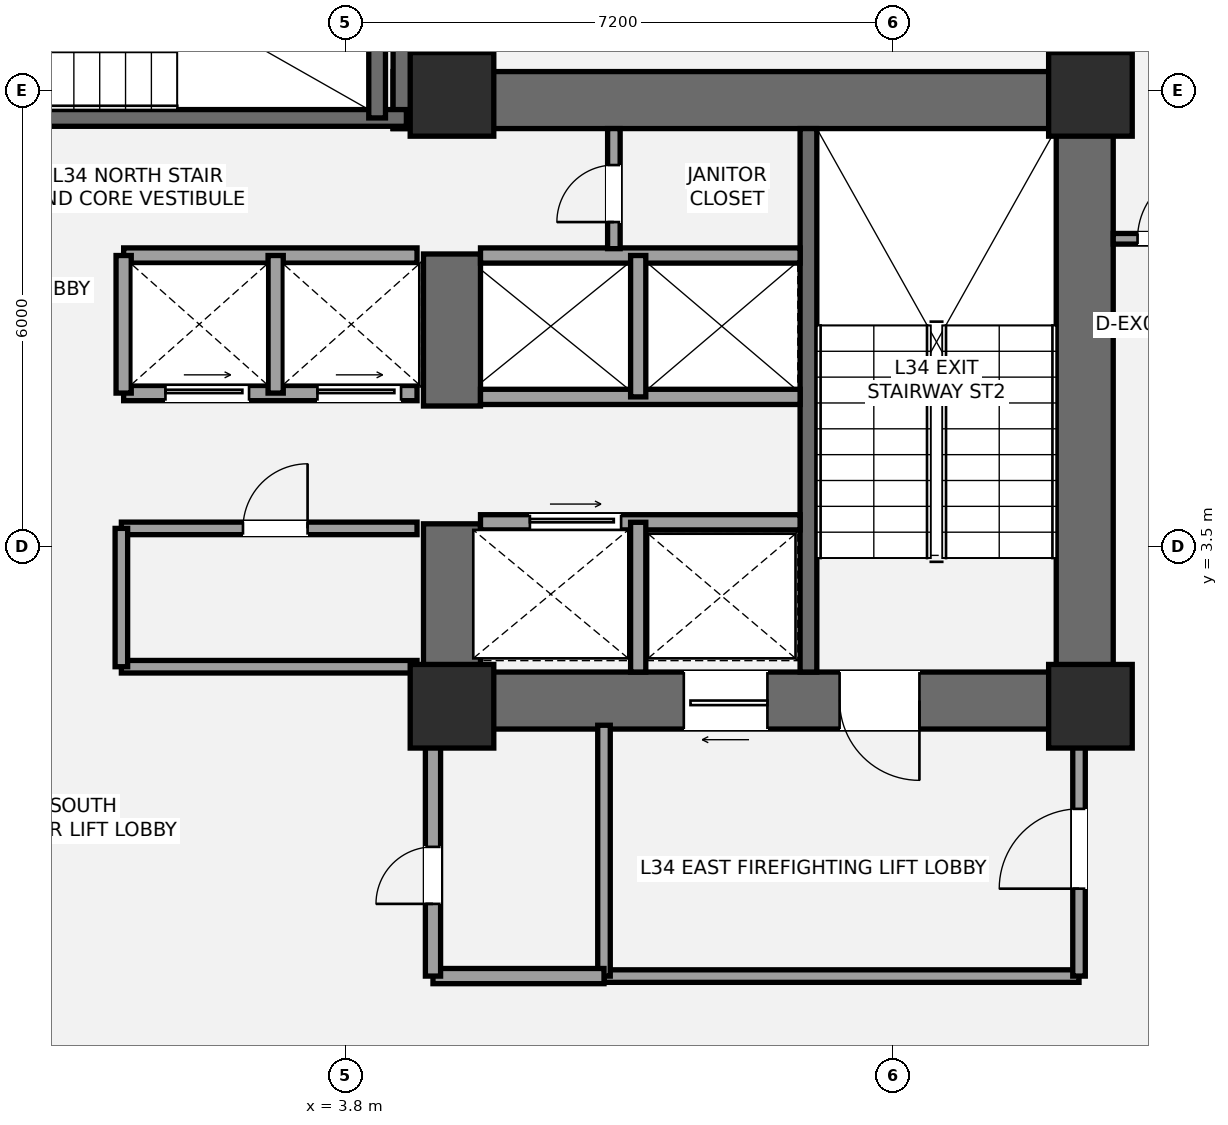
"""IFC4 building model, lengths in metres.
Left out: names, types, materials, properties, quantities, classifications, styles, units other than length and angle.
Written with IfcOpenShell. Run it as: python <this file> out.ifc"""

import sys

from ifc_helpers import new_model, si_unit, direction, frame, frame_2d, origin, origin_2d, place, context, subcontext, project, spatial, rectangle, extrude, element, fill, save


model = new_model("IFC4")
c1 = context("Model", 3, precision=1e-05, world=origin(), true_north=direction((0.0, 1.0)))
c2 = subcontext(c1, "Body", "Model", "MODEL_VIEW")
j1 = project(units=[si_unit("LENGTHUNIT", "METRE"), si_unit("PLANEANGLEUNIT", "RADIAN")], contexts=[c1])
p1 = place(None, origin())
s1 = spatial("IfcSite", under=j1, at=p1, CompositionType="ELEMENT")
p2 = place(p1, origin())
s2 = spatial("IfcBuilding", under=s1, at=p2, CompositionType="ELEMENT")
p3 = place(p2, frame((0.0, 0.0, 128.1)))
s3 = spatial("IfcBuildingStorey", under=s2, at=p3, CompositionType="ELEMENT", Elevation=128.1)
p4 = place(p3, frame((13.525, 1.1, 0.0), z_axis=(0.0, 0.0, 1.0), x_axis=(0.0, 1.0, 0.0)))
e1 = element("IfcWall", 1, at=p4, inside=s3, PredefinedType="SHEAR", context=c2, shape_type="SweptSolid", body=[
    extrude(rectangle(XDim=8.65, YDim=0.75, at=frame_2d((4.325, 0.0))), origin(), (0.0, 0.0, 1.0), 3.5),
])
p5 = place(p3, frame((4.425, 9.375, 0.0), z_axis=(0.0, 0.0, 1.0), x_axis=(1.0, 0.0, 0.0)))
e2 = element("IfcWall", 2, at=p5, inside=s3, PredefinedType="SHEAR", context=c2, shape_type="SweptSolid", body=[
    extrude(rectangle(XDim=9.475, YDim=0.75, at=frame_2d((4.737, 0.0))), origin(), (0.0, 0.0, 1.0), 3.5),
])
p6 = place(p3, frame((13.9, 1.475, 0.0), z_axis=(0.0, 0.0, 1.0), x_axis=(-1.0, 0.0, 0.0)))
e3 = element("IfcWall", 3, at=p6, inside=s3, PredefinedType="SHEAR", context=c2, shape_type="SweptSolid", body=[
    extrude(rectangle(XDim=9.075, YDim=0.75, at=frame_2d((4.538, 0.0))), origin(), (0.0, 0.0, 1.0), 3.5),
])
p7 = place(p6, frame((2.55, 0.0, 0.0)))
e4 = element("IfcOpeningElement", 4, at=p7, cuts=e3, PredefinedType="OPENING", context=c2, shape_type="SweptSolid", body=[
    extrude(rectangle(XDim=1.05, YDim=2.15, at=frame_2d((0.525, 1.075))), frame((0.0, 0.385, 0.0), z_axis=(0.0, -1.0, 0.0), x_axis=(1.0, 0.0, 0.0)), (0.0, 0.0, 1.0), 0.77),
])
p8 = place(p6, frame((4.55, 0.0, 0.0)))
e5 = element("IfcOpeningElement", 5, at=p8, cuts=e3, PredefinedType="OPENING", context=c2, shape_type="SweptSolid", body=[
    extrude(rectangle(XDim=1.1, YDim=2.2, at=frame_2d((0.55, 1.1))), frame((0.0, 0.385, 0.0), z_axis=(0.0, -1.0, 0.0), x_axis=(1.0, 0.0, 0.0)), (0.0, 0.0, 1.0), 0.77),
])
p9 = place(p3, frame((5.2, 1.1, 0.0), z_axis=(0.0, 0.0, 1.0), x_axis=(0.0, 1.0, 0.0)))
e6 = element("IfcWall", 6, at=p9, inside=s3, PredefinedType="SHEAR", context=c2, shape_type="SweptSolid", body=[
    extrude(rectangle(XDim=2.7, YDim=0.75, at=frame_2d((1.35, 0.0))), origin(), (0.0, 0.0, 1.0), 3.5),
])
p10 = place(p3, frame((5.2, 5.35, 0.0), z_axis=(0.0, 0.0, 1.0), x_axis=(0.0, 1.0, 0.0)))
e7 = element("IfcWall", 7, at=p10, inside=s3, PredefinedType="SHEAR", context=c2, shape_type="SweptSolid", body=[
    extrude(rectangle(XDim=2.0, YDim=0.75, at=frame_2d((1.0, 0.0))), origin(), (0.0, 0.0, 1.0), 3.5),
])
p11 = place(p3, frame((9.89, 1.85, 0.0), z_axis=(0.0, 0.0, 1.0), x_axis=(0.0, 1.0, 0.0)))
e8 = element("IfcWall", 8, at=p11, inside=s3, PredefinedType="SHEAR", context=c2, shape_type="SweptSolid", body=[
    extrude(rectangle(XDim=7.15, YDim=0.22, at=frame_2d((3.575, 0.0))), origin(), (0.0, 0.0, 1.0), 3.5),
])
p12 = place(p3, frame((4.8, 9.0, 0.0), z_axis=(0.0, 0.0, 1.0), x_axis=(0.0, 1.0, 0.0)))
e9 = element("IfcWall", 9, at=p12, inside=s3, PredefinedType="SHEAR", context=c2, shape_type="SweptSolid", body=[
    extrude(rectangle(XDim=4.15, YDim=0.75, at=frame_2d((2.075, 0.0))), origin(), (0.0, 0.0, 1.0), 3.5),
])
p13 = place(p3, frame((-4.7, 9.14, 0.0), z_axis=(0.0, 0.0, 1.0), x_axis=(1.0, 0.0, 0.0)))
e10 = element("IfcWall", 10, at=p13, inside=s3, PredefinedType="SHEAR", context=c2, shape_type="SweptSolid", body=[
    extrude(rectangle(XDim=9.3, YDim=0.22, at=frame_2d((4.65, 0.0))), origin(), (0.0, 0.0, 1.0), 3.5),
])
p14 = place(p13, frame((1.15, 0.0, 0.0)))
e11 = element("IfcOpeningElement", 11, at=p14, cuts=e10, PredefinedType="OPENING", context=c2, shape_type="SweptSolid", body=[
    extrude(rectangle(XDim=1.05, YDim=2.15, at=frame_2d((0.525, 1.075))), frame((0.0, 0.12, 0.0), z_axis=(0.0, -1.0, 0.0), x_axis=(1.0, 0.0, 0.0)), (0.0, 0.0, 1.0), 0.24),
])
p15 = place(p3, frame((4.215, 9.14, 0.0), z_axis=(0.0, 0.0, 1.0), x_axis=(0.0, 1.0, 0.0)))
e12 = element("IfcWall", 12, at=p15, inside=s3, PredefinedType="SHEAR", context=c2, shape_type="SweptSolid", body=[
    extrude(rectangle(XDim=3.26, YDim=0.22, at=frame_2d((1.63, 0.0))), origin(), (0.0, 0.0, 1.0), 3.5),
])
for number, where, z_axis, x_axis in (
    (13, (5.2, 1.4, 0.0), (0.0, 0.0, 1.0), (1.0, 0.0, 0.0)),
    (14, (5.2, 9.45, 0.0), (0.0, 0.0, 1.0), (1.0, 0.0, 0.0)),
    (15, (13.6, 1.4, 0.0), (0.0, 0.0, 1.0), (1.0, 0.0, 0.0)),
    (16, (13.6, 9.45, 0.0), (0.0, 0.0, 1.0), (1.0, 0.0, 0.0)),
):
    element("IfcColumn", number, at=place(p3, frame(where, z_axis=z_axis, x_axis=x_axis)), inside=s3, PredefinedType="COLUMN", context=c2, shape_type="SweptSolid", body=[
        extrude(rectangle(XDim=1.1, YDim=1.1, at=origin_2d()), origin(), (0.0, 0.0, 1.0), 3.5),
    ])
p16 = place(p3, frame((7.2, -2.15, 0.0), z_axis=(0.0, 0.0, 1.0), x_axis=(1.0, 0.0, 0.0)))
e17 = element("IfcWall", 17, at=p16, inside=s3, PredefinedType="PARTITIONING", context=c2, shape_type="SweptSolid", body=[
    extrude(rectangle(XDim=6.25, YDim=0.165, at=frame_2d((3.125, 0.0))), origin(), (0.0, 0.0, 1.0), 3.31),
])
p17 = place(p3, frame((7.2, -2.15, 0.0), z_axis=(0.0, 0.0, 1.0), x_axis=(0.0, 1.0, 0.0)))
e18 = element("IfcWall", 18, at=p17, inside=s3, PredefinedType="PARTITIONING", context=c2, shape_type="SweptSolid", body=[
    extrude(rectangle(XDim=3.3, YDim=0.165, at=frame_2d((1.65, 0.0))), origin(), (0.0, 0.0, 1.0), 2.763),
])
p18 = place(p3, frame((13.45, -2.15, 0.0), z_axis=(0.0, 0.0, 1.0), x_axis=(0.0, 1.0, 0.0)))
e19 = element("IfcWall", 19, at=p18, inside=s3, PredefinedType="PARTITIONING", context=c2, shape_type="SweptSolid", body=[
    extrude(rectangle(XDim=3.3, YDim=0.165, at=frame_2d((1.65, 0.0))), origin(), (0.0, 0.0, 1.0), 2.763),
])
p19 = place(p18, frame((1.15, 0.0, 0.0)))
e20 = element("IfcOpeningElement", 20, at=p19, cuts=e19, PredefinedType="OPENING", context=c2, shape_type="SweptSolid", body=[
    extrude(rectangle(XDim=1.05, YDim=2.15, at=frame_2d((0.525, 1.075))), frame((0.0, 0.093, 0.0), z_axis=(0.0, -1.0, 0.0), x_axis=(1.0, 0.0, 0.0)), (0.0, 0.0, 1.0), 0.185),
])
p20 = place(p3, frame((4.95, -2.15, 0.0), z_axis=(0.0, 0.0, 1.0), x_axis=(1.0, 0.0, 0.0)))
e21 = element("IfcWall", 21, at=p20, inside=s3, PredefinedType="SOLIDWALL", context=c2, shape_type="SweptSolid", body=[
    extrude(rectangle(XDim=2.25, YDim=0.2, at=frame_2d((1.125, 0.0))), origin(), (0.0, 0.0, 1.0), 3.31),
])
p21 = place(p3, frame((4.95, -2.15, 0.0), z_axis=(0.0, 0.0, 1.0), x_axis=(0.0, 1.0, 0.0)))
e22 = element("IfcWall", 22, at=p21, inside=s3, PredefinedType="SOLIDWALL", context=c2, shape_type="SweptSolid", body=[
    extrude(rectangle(XDim=3.3, YDim=0.2, at=frame_2d((1.65, 0.0))), origin(), (0.0, 0.0, 1.0), 2.763),
])
p22 = place(p21, frame((0.95, 0.0, 0.0)))
e23 = element("IfcOpeningElement", 23, at=p22, cuts=e22, PredefinedType="OPENING", context=c2, shape_type="SweptSolid", body=[
    extrude(rectangle(XDim=0.75, YDim=2.1, at=frame_2d((0.375, 1.05))), frame((0.0, 0.11, 0.0), z_axis=(0.0, -1.0, 0.0), x_axis=(1.0, 0.0, 0.0)), (0.0, 0.0, 1.0), 0.22),
])
p23 = place(p3, frame((5.575, 3.82, 0.0), z_axis=(0.0, 0.0, 1.0), x_axis=(1.0, 0.0, 0.0)))
e24 = element("IfcWall", 24, at=p23, inside=s3, PredefinedType="SOLIDWALL", context=c2, shape_type="SweptSolid", body=[
    extrude(rectangle(XDim=4.205, YDim=0.2, at=frame_2d((2.103, 0.0))), origin(), (0.0, 0.0, 1.0), 3.31),
])
p24 = place(p23, frame((0.65, 0.0, 0.0)))
e25 = element("IfcOpeningElement", 25, at=p24, cuts=e24, PredefinedType="OPENING", context=c2, shape_type="SweptSolid", body=[
    extrude(rectangle(XDim=1.2, YDim=2.2, at=frame_2d((0.6, 1.1))), frame((0.0, 0.11, 0.0), z_axis=(0.0, -1.0, 0.0), x_axis=(1.0, 0.0, 0.0)), (0.0, 0.0, 1.0), 0.22),
])
p25 = place(p3, frame((7.65, 1.85, 0.0), z_axis=(0.0, 0.0, 1.0), x_axis=(0.0, 1.0, 0.0)))
e26 = element("IfcWall", 26, at=p25, inside=s3, PredefinedType="SOLIDWALL", context=c2, shape_type="SweptSolid", body=[
    extrude(rectangle(XDim=1.97, YDim=0.2, at=frame_2d((0.985, 0.0))), origin(), (0.0, 0.0, 1.0), 3.31),
])
for number, where, z_axis, x_axis in (
    (27, (5.575, 5.47, 0.0), (0.0, 0.0, 1.0), (1.0, 0.0, 0.0)),
    (28, (5.575, 7.33, 0.0), (0.0, 0.0, 1.0), (1.0, 0.0, 0.0)),
):
    element("IfcWall", number, at=place(p3, frame(where, z_axis=z_axis, x_axis=x_axis)), inside=s3, PredefinedType="SOLIDWALL", context=c2, shape_type="SweptSolid", body=[
        extrude(rectangle(XDim=4.205, YDim=0.2, at=frame_2d((2.103, 0.0))), origin(), (0.0, 0.0, 1.0), 3.31),
    ])
p26 = place(p3, frame((7.65, 5.47, 0.0), z_axis=(0.0, 0.0, 1.0), x_axis=(0.0, 1.0, 0.0)))
e29 = element("IfcWall", 29, at=p26, inside=s3, PredefinedType="SOLIDWALL", context=c2, shape_type="SweptSolid", body=[
    extrude(rectangle(XDim=1.86, YDim=0.2, at=frame_2d((0.93, 0.0))), origin(), (0.0, 0.0, 1.0), 3.31),
])
p27 = place(p3, frame((0.85, 1.92, 0.0), z_axis=(0.0, 0.0, 1.0), x_axis=(1.0, 0.0, 0.0)))
e30 = element("IfcWall", 30, at=p27, inside=s3, PredefinedType="PARTITIONING", context=c2, shape_type="SweptSolid", body=[
    extrude(rectangle(XDim=3.89, YDim=0.165, at=frame_2d((1.945, 0.0))), origin(), (0.0, 0.0, 1.0), 2.3),
])
p28 = place(p3, frame((0.85, 3.74, 0.0), z_axis=(0.0, 0.0, 1.0), x_axis=(1.0, 0.0, 0.0)))
e31 = element("IfcWall", 31, at=p28, inside=s3, PredefinedType="PARTITIONING", context=c2, shape_type="SweptSolid", body=[
    extrude(rectangle(XDim=3.89, YDim=0.165, at=frame_2d((1.945, 0.0))), origin(), (0.0, 0.0, 1.0), 3.31),
])
p29 = place(p28, frame((1.6, 0.0, 0.0)))
e32 = element("IfcOpeningElement", 32, at=p29, cuts=e31, PredefinedType="OPENING", context=c2, shape_type="SweptSolid", body=[
    extrude(rectangle(XDim=0.85, YDim=2.1, at=frame_2d((0.425, 1.05))), frame((0.0, 0.093, 0.0), z_axis=(0.0, -1.0, 0.0), x_axis=(1.0, 0.0, 0.0)), (0.0, 0.0, 1.0), 0.185),
])
p30 = place(p3, frame((0.85, 1.92, 0.0), z_axis=(0.0, 0.0, 1.0), x_axis=(0.0, 1.0, 0.0)))
e33 = element("IfcWall", 33, at=p30, inside=s3, PredefinedType="PARTITIONING", context=c2, shape_type="SweptSolid", body=[
    extrude(rectangle(XDim=1.82, YDim=0.165, at=frame_2d((0.91, 0.0))), origin(), (0.0, 0.0, 1.0), 3.31),
])
p31 = place(p3, frame((0.88, 5.52, 0.0), z_axis=(0.0, 0.0, 1.0), x_axis=(1.0, 0.0, 0.0)))
e34 = element("IfcWall", 34, at=p31, inside=s3, PredefinedType="SOLIDWALL", context=c2, shape_type="SweptSolid", body=[
    extrude(rectangle(XDim=3.86, YDim=0.2, at=frame_2d((1.93, 0.0))), origin(), (0.0, 0.0, 1.0), 3.31),
])
p32 = place(p31, frame((0.55, 0.0, 0.0)))
e35 = element("IfcOpeningElement", 35, at=p32, cuts=e34, PredefinedType="OPENING", context=c2, shape_type="SweptSolid", body=[
    extrude(rectangle(XDim=1.1, YDim=2.2, at=frame_2d((0.55, 1.1))), frame((0.0, 0.11, 0.0), z_axis=(0.0, -1.0, 0.0), x_axis=(1.0, 0.0, 0.0)), (0.0, 0.0, 1.0), 0.22),
])
p33 = place(p31, frame((2.55, 0.0, 0.0)))
e36 = element("IfcOpeningElement", 36, at=p33, cuts=e34, PredefinedType="OPENING", context=c2, shape_type="SweptSolid", body=[
    extrude(rectangle(XDim=1.1, YDim=2.2, at=frame_2d((0.55, 1.1))), frame((0.0, 0.11, 0.0), z_axis=(0.0, -1.0, 0.0), x_axis=(1.0, 0.0, 0.0)), (0.0, 0.0, 1.0), 0.22),
])
p34 = place(p3, frame((0.88, 7.33, 0.0), z_axis=(0.0, 0.0, 1.0), x_axis=(1.0, 0.0, 0.0)))
e37 = element("IfcWall", 37, at=p34, inside=s3, PredefinedType="SOLIDWALL", context=c2, shape_type="SweptSolid", body=[
    extrude(rectangle(XDim=3.86, YDim=0.2, at=frame_2d((1.93, 0.0))), origin(), (0.0, 0.0, 1.0), 3.31),
])
for number, where, z_axis, x_axis in (
    (38, (2.88, 5.52, 0.0), (0.0, 0.0, 1.0), (0.0, 1.0, 0.0)),
    (39, (0.88, 5.52, 0.0), (0.0, 0.0, 1.0), (0.0, 1.0, 0.0)),
):
    element("IfcWall", number, at=place(p3, frame(where, z_axis=z_axis, x_axis=x_axis)), inside=s3, PredefinedType="SOLIDWALL", context=c2, shape_type="SweptSolid", body=[
        extrude(rectangle(XDim=1.81, YDim=0.2, at=frame_2d((0.905, 0.0))), origin(), (0.0, 0.0, 1.0), 3.31),
    ])
p35 = place(p3, frame((7.33, 7.42, 0.0), z_axis=(0.0, 0.0, 1.0), x_axis=(0.0, 1.0, 0.0)))
e40 = element("IfcWall", 40, at=p35, inside=s3, PredefinedType="PARTITIONING", context=c2, shape_type="SweptSolid", body=[
    extrude(rectangle(XDim=1.58, YDim=0.165, at=frame_2d((0.79, 0.0))), origin(), (0.0, 0.0, 1.0), 3.31),
])
p36 = place(p35, frame((0.35, 0.0, 0.0)))
e41 = element("IfcOpeningElement", 41, at=p36, cuts=e40, PredefinedType="OPENING", context=c2, shape_type="SweptSolid", body=[
    extrude(rectangle(XDim=0.75, YDim=2.1, at=frame_2d((0.375, 1.05))), frame((0.0, 0.093, 0.0), z_axis=(0.0, -1.0, 0.0), x_axis=(1.0, 0.0, 0.0)), (0.0, 0.0, 1.0), 0.185),
])
p37 = place(p3, frame((13.9, 7.55, 0.0), z_axis=(0.0, 0.0, 1.0), x_axis=(1.0, 0.0, 0.0)))
e42 = element("IfcWall", 42, at=p37, inside=s3, PredefinedType="PARTITIONING", context=c2, shape_type="SweptSolid", body=[
    extrude(rectangle(XDim=2.6, YDim=0.14, at=frame_2d((1.3, 0.0))), origin(), (0.0, 0.0, 1.0), 3.31),
])
p38 = place(p37, frame((0.32, 0.0, 0.0)))
e43 = element("IfcOpeningElement", 43, at=p38, cuts=e42, PredefinedType="OPENING", context=c2, shape_type="SweptSolid", body=[
    extrude(rectangle(XDim=0.92, YDim=2.15, at=frame_2d((0.46, 1.075))), frame((0.0, 0.08, 0.0), z_axis=(0.0, -1.0, 0.0), x_axis=(1.0, 0.0, 0.0)), (0.0, 0.0, 1.0), 0.16),
])
p39 = place(p7, origin())
e44 = element("IfcDoor", 44, at=p39, inside=s3, OperationType="SINGLE_SWING_LEFT", PredefinedType="DOOR", context=c2, shape_type="SweptSolid", body=[
    extrude(rectangle(XDim=1.05, YDim=2.15, at=frame_2d((0.525, 1.075))), frame((0.0, 0.025, 0.0), z_axis=(0.0, -1.0, 0.0), x_axis=(1.0, 0.0, 0.0)), (0.0, 0.0, 1.0), 0.05),
])
fill(e4, e44)
p40 = place(p19, origin())
e45 = element("IfcDoor", 45, at=p40, inside=s3, OperationType="SINGLE_SWING_LEFT", PredefinedType="DOOR", context=c2, shape_type="SweptSolid", body=[
    extrude(rectangle(XDim=1.05, YDim=2.15, at=frame_2d((0.525, 1.075))), frame((0.0, 0.025, 0.0), z_axis=(0.0, -1.0, 0.0), x_axis=(1.0, 0.0, 0.0)), (0.0, 0.0, 1.0), 0.05),
])
fill(e20, e45)
p41 = place(p22, origin())
e46 = element("IfcDoor", 46, at=p41, inside=s3, OperationType="SINGLE_SWING_LEFT", PredefinedType="DOOR", context=c2, shape_type="SweptSolid", body=[
    extrude(rectangle(XDim=0.75, YDim=2.1, at=frame_2d((0.375, 1.05))), frame((0.0, 0.025, 0.0), z_axis=(0.0, -1.0, 0.0), x_axis=(1.0, 0.0, 0.0)), (0.0, 0.0, 1.0), 0.05),
])
fill(e23, e46)
p42 = place(p8, origin())
e47 = element("IfcDoor", 47, at=p42, inside=s3, OperationType="SLIDING_TO_LEFT", PredefinedType="DOOR", context=c2, shape_type="SweptSolid", body=[
    extrude(rectangle(XDim=1.1, YDim=2.2, at=frame_2d((0.55, 1.1))), frame((0.0, 0.025, 0.0), z_axis=(0.0, -1.0, 0.0), x_axis=(1.0, 0.0, 0.0)), (0.0, 0.0, 1.0), 0.05),
])
fill(e5, e47)
p43 = place(p24, origin())
e48 = element("IfcDoor", 48, at=p43, inside=s3, OperationType="SLIDING_TO_RIGHT", PredefinedType="DOOR", context=c2, shape_type="SweptSolid", body=[
    extrude(rectangle(XDim=1.2, YDim=2.2, at=frame_2d((0.6, 1.1))), frame((0.0, 0.025, 0.0), z_axis=(0.0, -1.0, 0.0), x_axis=(1.0, 0.0, 0.0)), (0.0, 0.0, 1.0), 0.05),
])
fill(e25, e48)
p44 = place(p29, origin())
e49 = element("IfcDoor", 49, at=p44, inside=s3, OperationType="SINGLE_SWING_RIGHT", PredefinedType="DOOR", context=c2, shape_type="SweptSolid", body=[
    extrude(rectangle(XDim=0.85, YDim=2.1, at=frame_2d((0.425, 1.05))), frame((0.0, 0.025, 0.0), z_axis=(0.0, -1.0, 0.0), x_axis=(1.0, 0.0, 0.0)), (0.0, 0.0, 1.0), 0.05),
])
fill(e32, e49)
p45 = place(p32, origin())
e50 = element("IfcDoor", 50, at=p45, inside=s3, OperationType="SLIDING_TO_LEFT", PredefinedType="DOOR", context=c2, shape_type="SweptSolid", body=[
    extrude(rectangle(XDim=1.1, YDim=2.2, at=frame_2d((0.55, 1.1))), frame((0.0, 0.025, 0.0), z_axis=(0.0, -1.0, 0.0), x_axis=(1.0, 0.0, 0.0)), (0.0, 0.0, 1.0), 0.05),
])
fill(e35, e50)
p46 = place(p33, origin())
e51 = element("IfcDoor", 51, at=p46, inside=s3, OperationType="SLIDING_TO_LEFT", PredefinedType="DOOR", context=c2, shape_type="SweptSolid", body=[
    extrude(rectangle(XDim=1.1, YDim=2.2, at=frame_2d((0.55, 1.1))), frame((0.0, 0.025, 0.0), z_axis=(0.0, -1.0, 0.0), x_axis=(1.0, 0.0, 0.0)), (0.0, 0.0, 1.0), 0.05),
])
fill(e36, e51)
p47 = place(p36, origin())
e52 = element("IfcDoor", 52, at=p47, inside=s3, OperationType="SINGLE_SWING_LEFT", PredefinedType="DOOR", context=c2, shape_type="SweptSolid", body=[
    extrude(rectangle(XDim=0.75, YDim=2.1, at=frame_2d((0.375, 1.05))), frame((0.0, 0.025, 0.0), z_axis=(0.0, -1.0, 0.0), x_axis=(1.0, 0.0, 0.0)), (0.0, 0.0, 1.0), 0.05),
])
fill(e41, e52)
p48 = place(p38, origin())
e53 = element("IfcDoor", 53, at=p48, inside=s3, OperationType="SINGLE_SWING_RIGHT", PredefinedType="DOOR", context=c2, shape_type="SweptSolid", body=[
    extrude(rectangle(XDim=0.92, YDim=2.15, at=frame_2d((0.46, 1.075))), frame((0.0, 0.025, 0.0), z_axis=(0.0, -1.0, 0.0), x_axis=(1.0, 0.0, 0.0)), (0.0, 0.0, 1.0), 0.05),
])
fill(e43, e53)
save(model, sys.argv[1])
